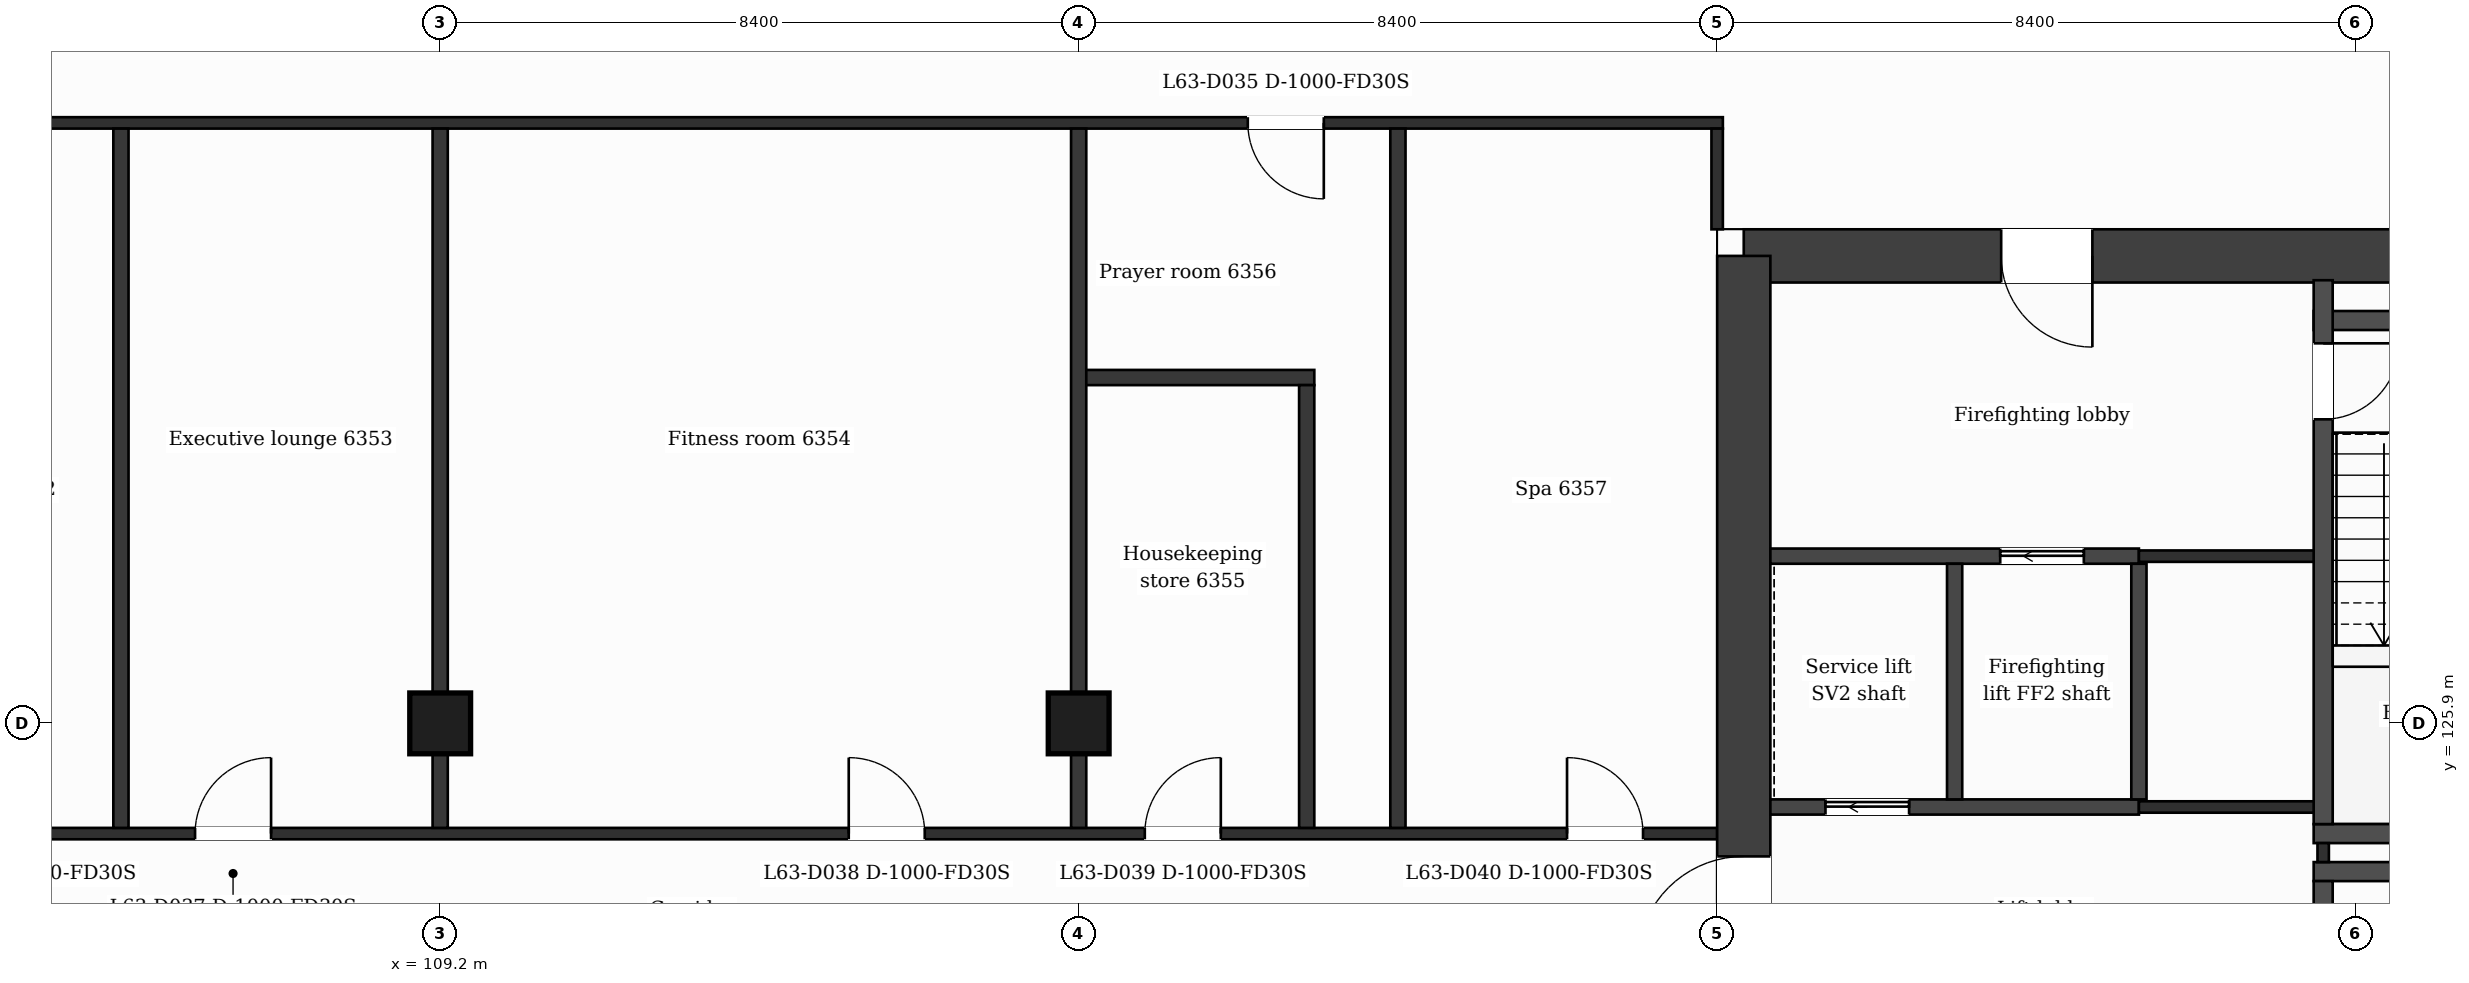
"""IFC4 building model, lengths in metres.
Left out: names, types, materials, properties, quantities, classifications, styles, units other than length and angle.
Written with IfcOpenShell. Run it as: python <this file> out.ifc"""

import sys

from ifc_helpers import new_model, si_unit, direction, frame, frame_2d, origin, origin_2d, place, context, subcontext, project, spatial, rectangle, extrude, element, fill, save


model = new_model("IFC4")
c1 = context("Model", 3, precision=1e-05, world=origin(), true_north=direction((0.0, 1.0)))
c2 = subcontext(c1, "Body", "Model", "MODEL_VIEW")
j1 = project(units=[si_unit("LENGTHUNIT", "METRE"), si_unit("PLANEANGLEUNIT", "RADIAN")], contexts=[c1])
p1 = place(None, origin())
s1 = spatial("IfcSite", under=j1, at=p1, CompositionType="ELEMENT")
p2 = place(p1, origin())
s2 = spatial("IfcBuilding", under=s1, at=p2, CompositionType="ELEMENT")
p3 = place(p2, frame((0.0, 0.0, 262.7)))
s3 = spatial("IfcBuildingStorey", under=s2, at=p3, CompositionType="ELEMENT", Elevation=262.7)
p4 = place(p3, frame((126.35, 132.05, 0.0), z_axis=(0.0, 0.0, 1.0), x_axis=(1.0, 0.0, 0.0)))
e1 = element("IfcWall", 1, at=p4, inside=s3, PredefinedType="SHEAR", context=c2, shape_type="SweptSolid", body=[
    extrude(rectangle(XDim=11.513, YDim=0.7, at=frame_2d((5.757, 0.0))), origin(), (0.0, 0.0, 1.0), 3.7),
])
p5 = place(p4, frame((3.386, 0.0, 0.0)))
e2 = element("IfcOpeningElement", 2, at=p5, cuts=e1, PredefinedType="OPENING", context=c2, shape_type="SweptSolid", body=[
    extrude(rectangle(XDim=1.2, YDim=2.1, at=frame_2d((0.6, 1.05))), frame((0.0, 0.36, 0.0), z_axis=(0.0, -1.0, 0.0), x_axis=(1.0, 0.0, 0.0)), (0.0, 0.0, 1.0), 0.72),
])
p6 = place(p3, frame((126.35, 110.75, 0.0), z_axis=(0.0, 0.0, 1.0), x_axis=(0.0, 1.0, 0.0)))
e3 = element("IfcWall", 3, at=p6, inside=s3, PredefinedType="SHEAR", context=c2, shape_type="SweptSolid", body=[
    extrude(rectangle(XDim=21.3, YDim=0.7, at=frame_2d((10.65, 0.0))), origin(), (0.0, 0.0, 1.0), 3.7),
])
p7 = place(p6, frame((12.0, 0.0, 0.0)))
e4 = element("IfcOpeningElement", 4, at=p7, cuts=e3, PredefinedType="OPENING", context=c2, shape_type="SweptSolid", body=[
    extrude(rectangle(XDim=1.4, YDim=2.1, at=frame_2d((0.7, 1.05))), frame((0.0, 0.36, 0.0), z_axis=(0.0, -1.0, 0.0), x_axis=(1.0, 0.0, 0.0)), (0.0, 0.0, 1.0), 0.72),
])
for number, where, z_axis, x_axis in (
    (5, (109.2, 125.9, 0.0), (0.0, 0.0, 1.0), (1.0, 0.0, 0.0)),
    (6, (117.6, 125.9, 0.0), (0.0, 0.0, 1.0), (1.0, 0.0, 0.0)),
):
    element("IfcColumn", number, at=place(p3, frame(where, z_axis=z_axis, x_axis=x_axis)), inside=s3, PredefinedType="COLUMN", context=c2, shape_type="SweptSolid", body=[
        extrude(rectangle(XDim=0.8, YDim=0.8, at=origin_2d()), origin(), (0.0, 0.0, 1.0), 3.7),
    ])
for number, where, z_axis, x_axis in (
    (7, (133.848, 123.95, 0.0), (0.0, 0.0, 1.0), (1.0, 0.0, 0.0)),
    (8, (133.848, 124.45, 0.0), (0.0, 0.0, 1.0), (1.0, 0.0, 0.0)),
):
    element("IfcWall", number, at=place(p3, frame(where, z_axis=z_axis, x_axis=x_axis)), inside=s3, PredefinedType="PARTITIONING", context=c2, shape_type="SweptSolid", body=[
        extrude(rectangle(XDim=3.4, YDim=0.25, at=frame_2d((1.7, 0.0))), origin(), (0.0, 0.0, 1.0), 3.38),
    ])
p8 = place(p3, frame((100.8, 124.45, 0.0), z_axis=(0.0, 0.0, 1.0), x_axis=(1.0, 0.0, 0.0)))
e9 = element("IfcWall", 9, at=p8, inside=s3, PredefinedType="PARTITIONING", context=c2, shape_type="SweptSolid", body=[
    extrude(rectangle(XDim=25.2, YDim=0.15, at=frame_2d((12.6, 0.0))), origin(), (0.0, 0.0, 1.0), 3.38),
])
p9 = place(p8, frame((0.975, 0.0, 0.0)))
e10 = element("IfcOpeningElement", 10, at=p9, cuts=e9, PredefinedType="OPENING", context=c2, shape_type="SweptSolid", body=[
    extrude(rectangle(XDim=1.0, YDim=2.1, at=frame_2d((0.5, 1.05))), frame((0.0, 0.085, 0.0), z_axis=(0.0, -1.0, 0.0), x_axis=(1.0, 0.0, 0.0)), (0.0, 0.0, 1.0), 0.17),
])
p10 = place(p8, frame((5.175, 0.0, 0.0)))
e11 = element("IfcOpeningElement", 11, at=p10, cuts=e9, PredefinedType="OPENING", context=c2, shape_type="SweptSolid", body=[
    extrude(rectangle(XDim=1.0, YDim=2.1, at=frame_2d((0.5, 1.05))), frame((0.0, 0.085, 0.0), z_axis=(0.0, -1.0, 0.0), x_axis=(1.0, 0.0, 0.0)), (0.0, 0.0, 1.0), 0.17),
])
p11 = place(p8, frame((13.775, 0.0, 0.0)))
e12 = element("IfcOpeningElement", 12, at=p11, cuts=e9, PredefinedType="OPENING", context=c2, shape_type="SweptSolid", body=[
    extrude(rectangle(XDim=1.0, YDim=2.1, at=frame_2d((0.5, 1.05))), frame((0.0, 0.085, 0.0), z_axis=(0.0, -1.0, 0.0), x_axis=(1.0, 0.0, 0.0)), (0.0, 0.0, 1.0), 0.17),
])
p12 = place(p8, frame((17.67, 0.0, 0.0)))
e13 = element("IfcOpeningElement", 13, at=p12, cuts=e9, PredefinedType="OPENING", context=c2, shape_type="SweptSolid", body=[
    extrude(rectangle(XDim=1.0, YDim=2.1, at=frame_2d((0.5, 1.05))), frame((0.0, 0.085, 0.0), z_axis=(0.0, -1.0, 0.0), x_axis=(1.0, 0.0, 0.0)), (0.0, 0.0, 1.0), 0.17),
])
p13 = place(p8, frame((23.225, 0.0, 0.0)))
e14 = element("IfcOpeningElement", 14, at=p13, cuts=e9, PredefinedType="OPENING", context=c2, shape_type="SweptSolid", body=[
    extrude(rectangle(XDim=1.0, YDim=2.1, at=frame_2d((0.5, 1.05))), frame((0.0, 0.085, 0.0), z_axis=(0.0, -1.0, 0.0), x_axis=(1.0, 0.0, 0.0)), (0.0, 0.0, 1.0), 0.17),
])
p14 = place(p3, frame((126.7, 124.8, 0.0), z_axis=(0.0, 0.0, 1.0), x_axis=(1.0, 0.0, 0.0)))
e15 = element("IfcWall", 15, at=p14, inside=s3, PredefinedType="PARTITIONING", context=c2, shape_type="SweptSolid", body=[
    extrude(rectangle(XDim=4.849, YDim=0.2, at=frame_2d((2.424, 0.0))), origin(), (0.0, 0.0, 1.0), 3.38),
])
p15 = place(p14, frame((0.725, 0.0, 0.0)))
e16 = element("IfcOpeningElement", 16, at=p15, cuts=e15, PredefinedType="OPENING", context=c2, shape_type="SweptSolid", body=[
    extrude(rectangle(XDim=1.1, YDim=2.1, at=frame_2d((0.55, 1.05))), frame((0.0, 0.11, 0.0), z_axis=(0.0, -1.0, 0.0), x_axis=(1.0, 0.0, 0.0)), (0.0, 0.0, 1.0), 0.22),
])
p16 = place(p3, frame((131.549, 124.8, 0.0), z_axis=(0.0, 0.0, 1.0), x_axis=(1.0, 0.0, 0.0)))
e17 = element("IfcWall", 17, at=p16, inside=s3, PredefinedType="PARTITIONING", context=c2, shape_type="SweptSolid", body=[
    extrude(rectangle(XDim=2.549, YDim=0.15, at=frame_2d((1.275, 0.0))), origin(), (0.0, 0.0, 1.0), 3.38),
])
p17 = place(p3, frame((126.7, 128.1, 0.0), z_axis=(0.0, 0.0, 1.0), x_axis=(1.0, 0.0, 0.0)))
e18 = element("IfcWall", 18, at=p17, inside=s3, PredefinedType="PARTITIONING", context=c2, shape_type="SweptSolid", body=[
    extrude(rectangle(XDim=4.849, YDim=0.2, at=frame_2d((2.424, 0.0))), origin(), (0.0, 0.0, 1.0), 3.38),
])
p18 = place(p17, frame((3.024, 0.0, 0.0)))
e19 = element("IfcOpeningElement", 19, at=p18, cuts=e18, PredefinedType="OPENING", context=c2, shape_type="SweptSolid", body=[
    extrude(rectangle(XDim=1.1, YDim=2.1, at=frame_2d((0.55, 1.05))), frame((0.0, 0.11, 0.0), z_axis=(0.0, -1.0, 0.0), x_axis=(1.0, 0.0, 0.0)), (0.0, 0.0, 1.0), 0.22),
])
p19 = place(p3, frame((131.549, 128.1, 0.0), z_axis=(0.0, 0.0, 1.0), x_axis=(1.0, 0.0, 0.0)))
e20 = element("IfcWall", 20, at=p19, inside=s3, PredefinedType="PARTITIONING", context=c2, shape_type="SweptSolid", body=[
    extrude(rectangle(XDim=2.424, YDim=0.15, at=frame_2d((1.212, 0.0))), origin(), (0.0, 0.0, 1.0), 3.38),
])
p20 = place(p3, frame((117.6, 130.45, 0.0), z_axis=(0.0, 0.0, 1.0), x_axis=(1.0, 0.0, 0.0)))
e21 = element("IfcWall", 21, at=p20, inside=s3, PredefinedType="PARTITIONING", context=c2, shape_type="SweptSolid", body=[
    extrude(rectangle(XDim=3.1, YDim=0.2, at=frame_2d((1.55, 0.0))), origin(), (0.0, 0.0, 1.0), 3.38),
])
p21 = place(p3, frame((133.848, 131.2, 0.0), z_axis=(0.0, 0.0, 1.0), x_axis=(1.0, 0.0, 0.0)))
e22 = element("IfcWall", 22, at=p21, inside=s3, PredefinedType="PARTITIONING", context=c2, shape_type="SweptSolid", body=[
    extrude(rectangle(XDim=3.807, YDim=0.25, at=frame_2d((1.903, 0.0))), origin(), (0.0, 0.0, 1.0), 3.38),
])
p22 = place(p3, frame((100.725, 133.8, 0.0), z_axis=(0.0, 0.0, 1.0), x_axis=(1.0, 0.0, 0.0)))
e23 = element("IfcWall", 23, at=p22, inside=s3, PredefinedType="PARTITIONING", context=c2, shape_type="SweptSolid", body=[
    extrude(rectangle(XDim=25.35, YDim=0.15, at=frame_2d((12.675, 0.0))), origin(), (0.0, 0.0, 1.0), 3.38),
])
p23 = place(p22, frame((19.1, 0.0, 0.0)))
e24 = element("IfcOpeningElement", 24, at=p23, cuts=e23, PredefinedType="OPENING", context=c2, shape_type="SweptSolid", body=[
    extrude(rectangle(XDim=1.0, YDim=2.1, at=frame_2d((0.5, 1.05))), frame((0.0, 0.085, 0.0), z_axis=(0.0, -1.0, 0.0), x_axis=(1.0, 0.0, 0.0)), (0.0, 0.0, 1.0), 0.17),
])
for number, where, z_axis, x_axis in (
    (25, (105.0, 124.525, 0.0), (0.0, 0.0, 1.0), (0.0, 1.0, 0.0)),
    (26, (109.2, 124.525, 0.0), (0.0, 0.0, 1.0), (0.0, 1.0, 0.0)),
    (27, (117.6, 124.525, 0.0), (0.0, 0.0, 1.0), (0.0, 1.0, 0.0)),
):
    element("IfcWall", number, at=place(p3, frame(where, z_axis=z_axis, x_axis=x_axis)), inside=s3, PredefinedType="PARTITIONING", context=c2, shape_type="SweptSolid", body=[
        extrude(rectangle(XDim=9.2, YDim=0.2, at=frame_2d((4.6, 0.0))), origin(), (0.0, 0.0, 1.0), 3.38),
    ])
p24 = place(p3, frame((120.6, 124.525, 0.0), z_axis=(0.0, 0.0, 1.0), x_axis=(0.0, 1.0, 0.0)))
e28 = element("IfcWall", 28, at=p24, inside=s3, PredefinedType="PARTITIONING", context=c2, shape_type="SweptSolid", body=[
    extrude(rectangle(XDim=5.825, YDim=0.2, at=frame_2d((2.913, 0.0))), origin(), (0.0, 0.0, 1.0), 3.38),
])
p25 = place(p3, frame((121.8, 124.525, 0.0), z_axis=(0.0, 0.0, 1.0), x_axis=(0.0, 1.0, 0.0)))
e29 = element("IfcWall", 29, at=p25, inside=s3, PredefinedType="PARTITIONING", context=c2, shape_type="SweptSolid", body=[
    extrude(rectangle(XDim=9.2, YDim=0.2, at=frame_2d((4.6, 0.0))), origin(), (0.0, 0.0, 1.0), 3.38),
])
p26 = place(p3, frame((126.0, 132.4, 0.0), z_axis=(0.0, 0.0, 1.0), x_axis=(0.0, 1.0, 0.0)))
e30 = element("IfcWall", 30, at=p26, inside=s3, PredefinedType="PARTITIONING", context=c2, shape_type="SweptSolid", body=[
    extrude(rectangle(XDim=1.325, YDim=0.15, at=frame_2d((0.663, 0.0))), origin(), (0.0, 0.0, 1.0), 3.38),
])
for number, where, z_axis, x_axis in (
    (31, (129.124, 124.9, 0.0), (0.0, 0.0, 1.0), (0.0, 1.0, 0.0)),
    (32, (131.549, 124.9, 0.0), (0.0, 0.0, 1.0), (0.0, 1.0, 0.0)),
):
    element("IfcWall", number, at=place(p3, frame(where, z_axis=z_axis, x_axis=x_axis)), inside=s3, PredefinedType="PARTITIONING", context=c2, shape_type="SweptSolid", body=[
        extrude(rectangle(XDim=3.1, YDim=0.2, at=frame_2d((1.55, 0.0))), origin(), (0.0, 0.0, 1.0), 3.38),
    ])
p27 = place(p3, frame((133.973, 124.075, 0.0), z_axis=(0.0, 0.0, 1.0), x_axis=(0.0, 1.0, 0.0)))
e33 = element("IfcWall", 33, at=p27, inside=s3, PredefinedType="PARTITIONING", context=c2, shape_type="SweptSolid", body=[
    extrude(rectangle(XDim=0.25, YDim=0.15, at=frame_2d((0.125, 0.0))), origin(), (0.0, 0.0, 1.0), 3.38),
])
p28 = place(p3, frame((133.973, 116.67, 0.0), z_axis=(0.0, 0.0, 1.0), x_axis=(0.0, 1.0, 0.0)))
e34 = element("IfcWall", 34, at=p28, inside=s3, PredefinedType="PARTITIONING", context=c2, shape_type="SweptSolid", body=[
    extrude(rectangle(XDim=7.155, YDim=0.25, at=frame_2d((3.578, 0.0))), origin(), (0.0, 0.0, 1.0), 3.38),
])
p29 = place(p28, frame((5.855, 0.0, 0.0)))
e35 = element("IfcOpeningElement", 35, at=p29, cuts=e34, PredefinedType="OPENING", context=c2, shape_type="SweptSolid", body=[
    extrude(rectangle(XDim=0.95, YDim=2.1, at=frame_2d((0.475, 1.05))), frame((0.0, 0.135, 0.0), z_axis=(0.0, -1.0, 0.0), x_axis=(1.0, 0.0, 0.0)), (0.0, 0.0, 1.0), 0.27),
])
p30 = place(p3, frame((133.973, 124.575, 0.0), z_axis=(0.0, 0.0, 1.0), x_axis=(0.0, 1.0, 0.0)))
e36 = element("IfcWall", 36, at=p30, inside=s3, PredefinedType="PARTITIONING", context=c2, shape_type="SweptSolid", body=[
    extrude(rectangle(XDim=7.155, YDim=0.25, at=frame_2d((3.578, 0.0))), origin(), (0.0, 0.0, 1.0), 3.38),
])
p31 = place(p30, frame((5.325, 0.0, 0.0)))
e37 = element("IfcOpeningElement", 37, at=p31, cuts=e36, PredefinedType="OPENING", context=c2, shape_type="SweptSolid", body=[
    extrude(rectangle(XDim=1.0, YDim=2.1, at=frame_2d((0.5, 1.05))), frame((0.0, 0.135, 0.0), z_axis=(0.0, -1.0, 0.0), x_axis=(1.0, 0.0, 0.0)), (0.0, 0.0, 1.0), 0.27),
])
p32 = place(p18, origin())
e38 = element("IfcDoor", 38, at=p32, inside=s3, OperationType="SLIDING_TO_LEFT", PredefinedType="DOOR", context=c2, shape_type="SweptSolid", body=[
    extrude(rectangle(XDim=1.1, YDim=2.1, at=frame_2d((0.55, 1.05))), frame((0.0, 0.025, 0.0), z_axis=(0.0, -1.0, 0.0), x_axis=(1.0, 0.0, 0.0)), (0.0, 0.0, 1.0), 0.05),
])
fill(e19, e38)
p33 = place(p15, origin())
e39 = element("IfcDoor", 39, at=p33, inside=s3, OperationType="SLIDING_TO_LEFT", PredefinedType="DOOR", context=c2, shape_type="SweptSolid", body=[
    extrude(rectangle(XDim=1.1, YDim=2.1, at=frame_2d((0.55, 1.05))), frame((0.0, 0.025, 0.0), z_axis=(0.0, -1.0, 0.0), x_axis=(1.0, 0.0, 0.0)), (0.0, 0.0, 1.0), 0.05),
])
fill(e16, e39)
p34 = place(p31, origin())
e40 = element("IfcDoor", 40, at=p34, inside=s3, OperationType="SINGLE_SWING_RIGHT", PredefinedType="DOOR", context=c2, shape_type="SweptSolid", body=[
    extrude(rectangle(XDim=1.0, YDim=2.1, at=frame_2d((0.5, 1.05))), frame((0.0, 0.025, 0.0), z_axis=(0.0, -1.0, 0.0), x_axis=(1.0, 0.0, 0.0)), (0.0, 0.0, 1.0), 0.05),
])
fill(e37, e40)
p35 = place(p23, origin())
e41 = element("IfcDoor", 41, at=p35, inside=s3, OperationType="SINGLE_SWING_RIGHT", PredefinedType="DOOR", context=c2, shape_type="SweptSolid", body=[
    extrude(rectangle(XDim=1.0, YDim=2.1, at=frame_2d((0.5, 1.05))), frame((0.0, 0.025, 0.0), z_axis=(0.0, -1.0, 0.0), x_axis=(1.0, 0.0, 0.0)), (0.0, 0.0, 1.0), 0.05),
])
fill(e24, e41)
p36 = place(p10, origin())
e42 = element("IfcDoor", 42, at=p36, inside=s3, OperationType="SINGLE_SWING_RIGHT", PredefinedType="DOOR", context=c2, shape_type="SweptSolid", body=[
    extrude(rectangle(XDim=1.0, YDim=2.1, at=frame_2d((0.5, 1.05))), frame((0.0, 0.025, 0.0), z_axis=(0.0, -1.0, 0.0), x_axis=(1.0, 0.0, 0.0)), (0.0, 0.0, 1.0), 0.05),
])
fill(e11, e42)
p37 = place(p11, origin())
e43 = element("IfcDoor", 43, at=p37, inside=s3, OperationType="SINGLE_SWING_LEFT", PredefinedType="DOOR", context=c2, shape_type="SweptSolid", body=[
    extrude(rectangle(XDim=1.0, YDim=2.1, at=frame_2d((0.5, 1.05))), frame((0.0, 0.025, 0.0), z_axis=(0.0, -1.0, 0.0), x_axis=(1.0, 0.0, 0.0)), (0.0, 0.0, 1.0), 0.05),
])
fill(e12, e43)
p38 = place(p12, origin())
e44 = element("IfcDoor", 44, at=p38, inside=s3, OperationType="SINGLE_SWING_RIGHT", PredefinedType="DOOR", context=c2, shape_type="SweptSolid", body=[
    extrude(rectangle(XDim=1.0, YDim=2.1, at=frame_2d((0.5, 1.05))), frame((0.0, 0.025, 0.0), z_axis=(0.0, -1.0, 0.0), x_axis=(1.0, 0.0, 0.0)), (0.0, 0.0, 1.0), 0.05),
])
fill(e13, e44)
p39 = place(p13, origin())
e45 = element("IfcDoor", 45, at=p39, inside=s3, OperationType="SINGLE_SWING_LEFT", PredefinedType="DOOR", context=c2, shape_type="SweptSolid", body=[
    extrude(rectangle(XDim=1.0, YDim=2.1, at=frame_2d((0.5, 1.05))), frame((0.0, 0.025, 0.0), z_axis=(0.0, -1.0, 0.0), x_axis=(1.0, 0.0, 0.0)), (0.0, 0.0, 1.0), 0.05),
])
fill(e14, e45)
p40 = place(p5, origin())
e46 = element("IfcDoor", 46, at=p40, inside=s3, OperationType="SINGLE_SWING_RIGHT", PredefinedType="DOOR", context=c2, shape_type="SweptSolid", body=[
    extrude(rectangle(XDim=1.2, YDim=2.1, at=frame_2d((0.6, 1.05))), frame((0.0, 0.025, 0.0), z_axis=(0.0, -1.0, 0.0), x_axis=(1.0, 0.0, 0.0)), (0.0, 0.0, 1.0), 0.05),
])
fill(e2, e46)
p41 = place(p7, origin())
e47 = element("IfcDoor", 47, at=p41, inside=s3, OperationType="SINGLE_SWING_LEFT", PredefinedType="DOOR", context=c2, shape_type="SweptSolid", body=[
    extrude(rectangle(XDim=1.4, YDim=2.1, at=frame_2d((0.7, 1.05))), frame((0.0, 0.025, 0.0), z_axis=(0.0, -1.0, 0.0), x_axis=(1.0, 0.0, 0.0)), (0.0, 0.0, 1.0), 0.05),
])
fill(e4, e47)
save(model, sys.argv[1])
